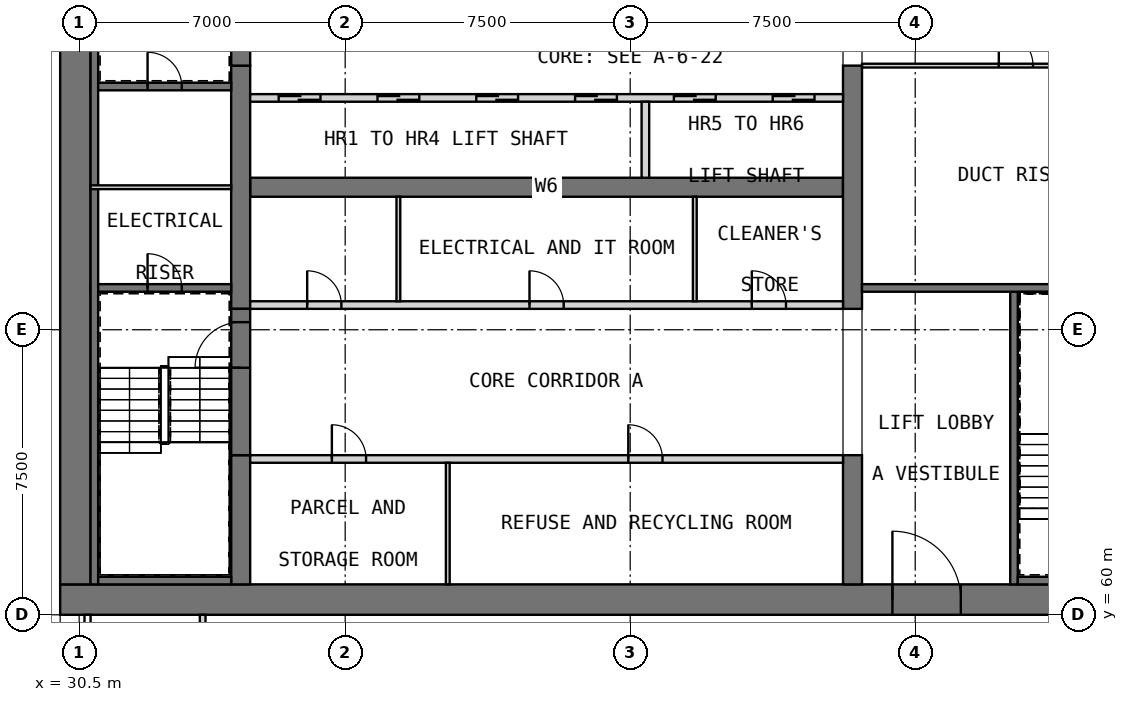
"""IFC4 building model, lengths in metres.
Left out: names, types, materials, properties, quantities, classifications, styles, units other than length and angle.
Written with IfcOpenShell. Run it as: python <this file> out.ifc"""

import sys

from ifc_helpers import new_model, si_unit, direction, frame, frame_2d, origin, place, context, subcontext, project, spatial, rectangle, extrude, element, fill, save


model = new_model("IFC4")
c1 = context("Model", 3, precision=1e-05, world=origin(), true_north=direction((0.0, 1.0)))
c2 = subcontext(c1, "Body", "Model", "MODEL_VIEW")
j1 = project(units=[si_unit("LENGTHUNIT", "METRE"), si_unit("PLANEANGLEUNIT", "RADIAN")], contexts=[c1])
p1 = place(None, origin())
s1 = spatial("IfcSite", under=j1, at=p1, CompositionType="ELEMENT")
p2 = place(p1, origin())
s2 = spatial("IfcBuilding", under=s1, at=p2, CompositionType="ELEMENT")
p3 = place(p2, frame((0.0, 0.0, 174.2)))
s3 = spatial("IfcBuildingStorey", under=s2, at=p3, CompositionType="ELEMENT", Elevation=174.2)
p4 = place(p3, frame((30.0, 60.4, 0.0), z_axis=(0.0, 0.0, 1.0), x_axis=(1.0, 0.0, 0.0)))
e1 = element("IfcWall", 1, at=p4, inside=s3, PredefinedType="SHEAR", context=c2, shape_type="SweptSolid", body=[
    extrude(rectangle(XDim=30.0, YDim=0.8, at=frame_2d((15.0, 0.0))), origin(), (0.0, 0.0, 1.0), 5.0),
])
p5 = place(p4, frame((21.9, 0.0, 0.0)))
e2 = element("IfcOpeningElement", 2, at=p5, cuts=e1, PredefinedType="OPENING", context=c2, shape_type="SweptSolid", body=[
    extrude(rectangle(XDim=1.8, YDim=2.1, at=frame_2d((0.9, 1.05))), frame((0.0, 0.41, 0.0), z_axis=(0.0, -1.0, 0.0), x_axis=(1.0, 0.0, 0.0)), (0.0, 0.0, 1.0), 0.82),
])
p6 = place(p4, frame((26.5, 0.0, 0.0)))
e3 = element("IfcOpeningElement", 3, at=p6, cuts=e1, PredefinedType="OPENING", context=c2, shape_type="SweptSolid", body=[
    extrude(rectangle(XDim=1.2, YDim=2.1, at=frame_2d((0.6, 1.05))), frame((0.0, 0.41, 0.0), z_axis=(0.0, -1.0, 0.0), x_axis=(1.0, 0.0, 0.0)), (0.0, 0.0, 1.0), 0.82),
])
p7 = place(p3, frame((30.4, 60.8, 0.0), z_axis=(0.0, 0.0, 1.0), x_axis=(0.0, 1.0, 0.0)))
e4 = element("IfcWall", 4, at=p7, inside=s3, PredefinedType="SHEAR", context=c2, shape_type="SweptSolid", body=[
    extrude(rectangle(XDim=20.9, YDim=0.8, at=frame_2d((10.45, 0.0))), origin(), (0.0, 0.0, 1.0), 5.0),
])
p8 = place(p3, frame((35.0, 71.25, 0.0), z_axis=(0.0, 0.0, 1.0), x_axis=(1.0, 0.0, 0.0)))
e5 = element("IfcWall", 5, at=p8, inside=s3, PredefinedType="SHEAR", context=c2, shape_type="SweptSolid", body=[
    extrude(rectangle(XDim=15.6, YDim=0.5, at=frame_2d((7.8, 0.0))), origin(), (0.0, 0.0, 1.0), 5.0),
])
p9 = place(p3, frame((34.75, 60.8, 0.0), z_axis=(0.0, 0.0, 1.0), x_axis=(0.0, 1.0, 0.0)))
e6 = element("IfcWall", 6, at=p9, inside=s3, PredefinedType="SHEAR", context=c2, shape_type="SweptSolid", body=[
    extrude(rectangle(XDim=3.4, YDim=0.5, at=frame_2d((1.7, 0.0))), origin(), (0.0, 0.0, 1.0), 5.0),
])
p10 = place(p3, frame((34.75, 68.05, 0.0), z_axis=(0.0, 0.0, 1.0), x_axis=(0.0, 1.0, 0.0)))
e7 = element("IfcWall", 7, at=p10, inside=s3, PredefinedType="SHEAR", context=c2, shape_type="SweptSolid", body=[
    extrude(rectangle(XDim=6.4, YDim=0.5, at=frame_2d((3.2, 0.0))), origin(), (0.0, 0.0, 1.0), 5.0),
])
p11 = place(p3, frame((50.85, 60.8, 0.0), z_axis=(0.0, 0.0, 1.0), x_axis=(0.0, 1.0, 0.0)))
e8 = element("IfcWall", 8, at=p11, inside=s3, PredefinedType="SHEAR", context=c2, shape_type="SweptSolid", body=[
    extrude(rectangle(XDim=3.4, YDim=0.5, at=frame_2d((1.7, 0.0))), origin(), (0.0, 0.0, 1.0), 5.0),
])
p12 = place(p3, frame((50.85, 68.05, 0.0), z_axis=(0.0, 0.0, 1.0), x_axis=(0.0, 1.0, 0.0)))
e9 = element("IfcWall", 9, at=p12, inside=s3, PredefinedType="SHEAR", context=c2, shape_type="SweptSolid", body=[
    extrude(rectangle(XDim=6.4, YDim=0.5, at=frame_2d((3.2, 0.0))), origin(), (0.0, 0.0, 1.0), 5.0),
])
p13 = place(p2, frame((0.0, 0.0, 34.0)))
s4 = spatial("IfcBuildingStorey", under=s2, at=p13, CompositionType="ELEMENT", Elevation=34.0)
for number, where, z_axis, x_axis in (
    (10, (29.7, 61.05, 0.0), (0.0, 0.0, 1.0), (0.0, 1.0, 0.0)),
    (11, (29.7, 65.925, 0.0), (0.0, 0.0, 1.0), (0.0, 1.0, 0.0)),
    (12, (29.7, 70.8, 0.0), (0.0, 0.0, 1.0), (0.0, 1.0, 0.0)),
):
    element("IfcWall", number, at=place(p13, frame(where, z_axis=z_axis, x_axis=x_axis)), inside=s4, PredefinedType="SOLIDWALL", context=c2, shape_type="SweptSolid", body=[
        extrude(rectangle(XDim=0.9, YDim=0.6, at=frame_2d((0.45, 0.0))), origin(), (0.0, 0.0, 1.0), 286.2),
    ])
p14 = place(p3, frame((35.0, 64.1, 0.0), z_axis=(0.0, 0.0, 1.0), x_axis=(1.0, 0.0, 0.0)))
e13 = element("IfcWall", 13, at=p14, inside=s3, PredefinedType="PARTITIONING", context=c2, shape_type="SweptSolid", body=[
    extrude(rectangle(XDim=15.6, YDim=0.2, at=frame_2d((7.8, 0.0))), origin(), (0.0, 0.0, 1.0), 4.75),
])
p15 = place(p14, frame((2.15, 0.0, 0.0)))
e14 = element("IfcOpeningElement", 14, at=p15, cuts=e13, PredefinedType="OPENING", context=c2, shape_type="SweptSolid", body=[
    extrude(rectangle(XDim=0.9, YDim=2.1, at=frame_2d((0.45, 1.05))), frame((0.0, 0.11, 0.0), z_axis=(0.0, -1.0, 0.0), x_axis=(1.0, 0.0, 0.0)), (0.0, 0.0, 1.0), 0.22),
])
p16 = place(p14, frame((9.95, 0.0, 0.0)))
e15 = element("IfcOpeningElement", 15, at=p16, cuts=e13, PredefinedType="OPENING", context=c2, shape_type="SweptSolid", body=[
    extrude(rectangle(XDim=0.9, YDim=2.1, at=frame_2d((0.45, 1.05))), frame((0.0, 0.11, 0.0), z_axis=(0.0, -1.0, 0.0), x_axis=(1.0, 0.0, 0.0)), (0.0, 0.0, 1.0), 0.22),
])
p17 = place(p3, frame((40.2, 60.8, 0.0), z_axis=(0.0, 0.0, 1.0), x_axis=(0.0, 1.0, 0.0)))
e16 = element("IfcWall", 16, at=p17, inside=s3, PredefinedType="PARTITIONING", context=c2, shape_type="SweptSolid", body=[
    extrude(rectangle(XDim=3.2, YDim=0.1, at=frame_2d((1.6, 0.0))), origin(), (0.0, 0.0, 1.0), 4.75),
])
p18 = place(p3, frame((35.0, 68.15, 0.0), z_axis=(0.0, 0.0, 1.0), x_axis=(1.0, 0.0, 0.0)))
e17 = element("IfcWall", 17, at=p18, inside=s3, PredefinedType="PARTITIONING", context=c2, shape_type="SweptSolid", body=[
    extrude(rectangle(XDim=15.6, YDim=0.2, at=frame_2d((7.8, 0.0))), origin(), (0.0, 0.0, 1.0), 4.75),
])
p19 = place(p18, frame((1.5, 0.0, 0.0)))
e18 = element("IfcOpeningElement", 18, at=p19, cuts=e17, PredefinedType="OPENING", context=c2, shape_type="SweptSolid", body=[
    extrude(rectangle(XDim=0.9, YDim=2.1, at=frame_2d((0.45, 1.05))), frame((0.0, 0.11, 0.0), z_axis=(0.0, -1.0, 0.0), x_axis=(1.0, 0.0, 0.0)), (0.0, 0.0, 1.0), 0.22),
])
p20 = place(p18, frame((7.35, 0.0, 0.0)))
e19 = element("IfcOpeningElement", 19, at=p20, cuts=e17, PredefinedType="OPENING", context=c2, shape_type="SweptSolid", body=[
    extrude(rectangle(XDim=0.9, YDim=2.1, at=frame_2d((0.45, 1.05))), frame((0.0, 0.11, 0.0), z_axis=(0.0, -1.0, 0.0), x_axis=(1.0, 0.0, 0.0)), (0.0, 0.0, 1.0), 0.22),
])
p21 = place(p18, frame((13.2, 0.0, 0.0)))
e20 = element("IfcOpeningElement", 20, at=p21, cuts=e17, PredefinedType="OPENING", context=c2, shape_type="SweptSolid", body=[
    extrude(rectangle(XDim=0.9, YDim=2.1, at=frame_2d((0.45, 1.05))), frame((0.0, 0.11, 0.0), z_axis=(0.0, -1.0, 0.0), x_axis=(1.0, 0.0, 0.0)), (0.0, 0.0, 1.0), 0.22),
])
for number, where, z_axis, x_axis in (
    (21, (38.9, 68.25, 0.0), (0.0, 0.0, 1.0), (0.0, 1.0, 0.0)),
    (22, (46.7, 68.25, 0.0), (0.0, 0.0, 1.0), (0.0, 1.0, 0.0)),
):
    element("IfcWall", number, at=place(p3, frame(where, z_axis=z_axis, x_axis=x_axis)), inside=s3, PredefinedType="PARTITIONING", context=c2, shape_type="SweptSolid", body=[
        extrude(rectangle(XDim=2.75, YDim=0.1, at=frame_2d((1.375, 0.0))), origin(), (0.0, 0.0, 1.0), 4.75),
    ])
p22 = place(p3, frame((35.0, 73.6, 0.0), z_axis=(0.0, 0.0, 1.0), x_axis=(1.0, 0.0, 0.0)))
e23 = element("IfcWall", 23, at=p22, inside=s3, PredefinedType="SOLIDWALL", context=c2, shape_type="SweptSolid", body=[
    extrude(rectangle(XDim=15.6, YDim=0.2, at=frame_2d((7.8, 0.0))), origin(), (0.0, 0.0, 1.0), 5.0),
])
p23 = place(p22, frame((0.75, 0.0, 0.0)))
e24 = element("IfcOpeningElement", 24, at=p23, cuts=e23, PredefinedType="OPENING", context=c2, shape_type="SweptSolid", body=[
    extrude(rectangle(XDim=1.1, YDim=2.1, at=frame_2d((0.55, 1.05))), frame((0.0, 0.11, 0.0), z_axis=(0.0, -1.0, 0.0), x_axis=(1.0, 0.0, 0.0)), (0.0, 0.0, 1.0), 0.22),
])
p24 = place(p22, frame((3.35, 0.0, 0.0)))
e25 = element("IfcOpeningElement", 25, at=p24, cuts=e23, PredefinedType="OPENING", context=c2, shape_type="SweptSolid", body=[
    extrude(rectangle(XDim=1.1, YDim=2.1, at=frame_2d((0.55, 1.05))), frame((0.0, 0.11, 0.0), z_axis=(0.0, -1.0, 0.0), x_axis=(1.0, 0.0, 0.0)), (0.0, 0.0, 1.0), 0.22),
])
p25 = place(p22, frame((5.95, 0.0, 0.0)))
e26 = element("IfcOpeningElement", 26, at=p25, cuts=e23, PredefinedType="OPENING", context=c2, shape_type="SweptSolid", body=[
    extrude(rectangle(XDim=1.1, YDim=2.1, at=frame_2d((0.55, 1.05))), frame((0.0, 0.11, 0.0), z_axis=(0.0, -1.0, 0.0), x_axis=(1.0, 0.0, 0.0)), (0.0, 0.0, 1.0), 0.22),
])
p26 = place(p22, frame((8.55, 0.0, 0.0)))
e27 = element("IfcOpeningElement", 27, at=p26, cuts=e23, PredefinedType="OPENING", context=c2, shape_type="SweptSolid", body=[
    extrude(rectangle(XDim=1.1, YDim=2.1, at=frame_2d((0.55, 1.05))), frame((0.0, 0.11, 0.0), z_axis=(0.0, -1.0, 0.0), x_axis=(1.0, 0.0, 0.0)), (0.0, 0.0, 1.0), 0.22),
])
p27 = place(p22, frame((11.15, 0.0, 0.0)))
e28 = element("IfcOpeningElement", 28, at=p27, cuts=e23, PredefinedType="OPENING", context=c2, shape_type="SweptSolid", body=[
    extrude(rectangle(XDim=1.1, YDim=2.1, at=frame_2d((0.55, 1.05))), frame((0.0, 0.11, 0.0), z_axis=(0.0, -1.0, 0.0), x_axis=(1.0, 0.0, 0.0)), (0.0, 0.0, 1.0), 0.22),
])
p28 = place(p22, frame((13.75, 0.0, 0.0)))
e29 = element("IfcOpeningElement", 29, at=p28, cuts=e23, PredefinedType="OPENING", context=c2, shape_type="SweptSolid", body=[
    extrude(rectangle(XDim=1.1, YDim=2.1, at=frame_2d((0.55, 1.05))), frame((0.0, 0.11, 0.0), z_axis=(0.0, -1.0, 0.0), x_axis=(1.0, 0.0, 0.0)), (0.0, 0.0, 1.0), 0.22),
])
p29 = place(p3, frame((45.4, 71.5, 0.0), z_axis=(0.0, 0.0, 1.0), x_axis=(0.0, 1.0, 0.0)))
e30 = element("IfcWall", 30, at=p29, inside=s3, PredefinedType="SOLIDWALL", context=c2, shape_type="SweptSolid", body=[
    extrude(rectangle(XDim=2.0, YDim=0.2, at=frame_2d((1.0, 0.0))), origin(), (0.0, 0.0, 1.0), 5.0),
])
p30 = place(p3, frame((34.75, 64.2, 0.0), z_axis=(0.0, 0.0, 1.0), x_axis=(0.0, 1.0, 0.0)))
e31 = element("IfcWall", 31, at=p30, inside=s3, PredefinedType="SOLIDWALL", context=c2, shape_type="SweptSolid", body=[
    extrude(rectangle(XDim=3.85, YDim=0.5, at=frame_2d((1.925, 0.0))), origin(), (0.0, 0.0, 1.0), 3.8),
])
p31 = place(p30, frame((2.3, 0.0, 0.0)))
e32 = element("IfcOpeningElement", 32, at=p31, cuts=e31, PredefinedType="OPENING", context=c2, shape_type="SweptSolid", body=[
    extrude(rectangle(XDim=1.2, YDim=2.1, at=frame_2d((0.6, 1.05))), frame((0.0, 0.26, 0.0), z_axis=(0.0, -1.0, 0.0), x_axis=(1.0, 0.0, 0.0)), (0.0, 0.0, 1.0), 0.52),
])
p32 = place(p3, frame((34.75, 74.45, 0.0), z_axis=(0.0, 0.0, 1.0), x_axis=(0.0, 1.0, 0.0)))
e33 = element("IfcWall", 33, at=p32, inside=s3, PredefinedType="SOLIDWALL", context=c2, shape_type="SweptSolid", body=[
    extrude(rectangle(XDim=3.85, YDim=0.5, at=frame_2d((1.925, 0.0))), origin(), (0.0, 0.0, 1.0), 3.8),
])
p33 = place(p32, frame((1.0, 0.0, 0.0)))
e34 = element("IfcOpeningElement", 34, at=p33, cuts=e33, PredefinedType="OPENING", context=c2, shape_type="SweptSolid", body=[
    extrude(rectangle(XDim=1.2, YDim=2.1, at=frame_2d((0.6, 1.05))), frame((0.0, 0.26, 0.0), z_axis=(0.0, -1.0, 0.0), x_axis=(1.0, 0.0, 0.0)), (0.0, 0.0, 1.0), 0.52),
])
p34 = place(p3, frame((30.8, 68.6, 0.0), z_axis=(0.0, 0.0, 1.0), x_axis=(1.0, 0.0, 0.0)))
e35 = element("IfcWall", 35, at=p34, inside=s3, PredefinedType="SOLIDWALL", context=c2, shape_type="SweptSolid", body=[
    extrude(rectangle(XDim=3.7, YDim=0.2, at=frame_2d((1.85, 0.0))), origin(), (0.0, 0.0, 1.0), 4.75),
])
p35 = place(p34, frame((1.5, 0.0, 0.0)))
e36 = element("IfcOpeningElement", 36, at=p35, cuts=e35, PredefinedType="OPENING", context=c2, shape_type="SweptSolid", body=[
    extrude(rectangle(XDim=0.9, YDim=2.1, at=frame_2d((0.45, 1.05))), frame((0.0, 0.11, 0.0), z_axis=(0.0, -1.0, 0.0), x_axis=(1.0, 0.0, 0.0)), (0.0, 0.0, 1.0), 0.22),
])
p36 = place(p3, frame((30.8, 73.9, 0.0), z_axis=(0.0, 0.0, 1.0), x_axis=(1.0, 0.0, 0.0)))
e37 = element("IfcWall", 37, at=p36, inside=s3, PredefinedType="SOLIDWALL", context=c2, shape_type="SweptSolid", body=[
    extrude(rectangle(XDim=3.7, YDim=0.2, at=frame_2d((1.85, 0.0))), origin(), (0.0, 0.0, 1.0), 4.75),
])
p37 = place(p36, frame((1.5, 0.0, 0.0)))
e38 = element("IfcOpeningElement", 38, at=p37, cuts=e37, PredefinedType="OPENING", context=c2, shape_type="SweptSolid", body=[
    extrude(rectangle(XDim=0.9, YDim=2.1, at=frame_2d((0.45, 1.05))), frame((0.0, 0.11, 0.0), z_axis=(0.0, -1.0, 0.0), x_axis=(1.0, 0.0, 0.0)), (0.0, 0.0, 1.0), 0.22),
])
p38 = place(p3, frame((55.1, 60.8, 0.0), z_axis=(0.0, 0.0, 1.0), x_axis=(0.0, 1.0, 0.0)))
e39 = element("IfcWall", 39, at=p38, inside=s3, PredefinedType="SOLIDWALL", context=c2, shape_type="SweptSolid", body=[
    extrude(rectangle(XDim=7.8, YDim=0.2, at=frame_2d((3.9, 0.0))), origin(), (0.0, 0.0, 1.0), 4.75),
])
p39 = place(p3, frame((51.1, 68.6, 0.0), z_axis=(0.0, 0.0, 1.0), x_axis=(1.0, 0.0, 0.0)))
e40 = element("IfcWall", 40, at=p39, inside=s3, PredefinedType="SOLIDWALL", context=c2, shape_type="SweptSolid", body=[
    extrude(rectangle(XDim=8.1, YDim=0.2, at=frame_2d((4.05, 0.0))), origin(), (0.0, 0.0, 1.0), 4.75),
])
p40 = place(p3, frame((30.9, 60.8, 0.0), z_axis=(0.0, 0.0, 1.0), x_axis=(0.0, 1.0, 0.0)))
e41 = element("IfcWall", 41, at=p40, inside=s3, PredefinedType="SOLIDWALL", context=c2, shape_type="SweptSolid", body=[
    extrude(rectangle(XDim=20.9, YDim=0.2, at=frame_2d((10.45, 0.0))), origin(), (0.0, 0.0, 1.0), 4.75),
])
p41 = place(p3, frame((31.0, 60.9, 0.0), z_axis=(0.0, 0.0, 1.0), x_axis=(1.0, 0.0, 0.0)))
e42 = element("IfcWall", 42, at=p41, inside=s3, PredefinedType="SOLIDWALL", context=c2, shape_type="SweptSolid", body=[
    extrude(rectangle(XDim=3.5, YDim=0.2, at=frame_2d((1.75, 0.0))), origin(), (0.0, 0.0, 1.0), 4.75),
])
p42 = place(p3, frame((55.2, 60.9, 0.0), z_axis=(0.0, 0.0, 1.0), x_axis=(1.0, 0.0, 0.0)))
e43 = element("IfcWall", 43, at=p42, inside=s3, PredefinedType="SOLIDWALL", context=c2, shape_type="SweptSolid", body=[
    extrude(rectangle(XDim=1.3, YDim=0.2, at=frame_2d((0.65, 0.0))), origin(), (0.0, 0.0, 1.0), 4.75),
])
p43 = place(p3, frame((30.8, 71.25, 0.0), z_axis=(0.0, 0.0, 1.0), x_axis=(1.0, 0.0, 0.0)))
e44 = element("IfcWall", 44, at=p43, inside=s3, PredefinedType="PARTITIONING", context=c2, shape_type="SweptSolid", body=[
    extrude(rectangle(XDim=3.7, YDim=0.1, at=frame_2d((1.85, 0.0))), origin(), (0.0, 0.0, 1.0), 4.75),
])
p44 = place(p3, frame((51.1, 74.45, 0.0), z_axis=(0.0, 0.0, 1.0), x_axis=(1.0, 0.0, 0.0)))
e45 = element("IfcWall", 45, at=p44, inside=s3, PredefinedType="PARTITIONING", context=c2, shape_type="SweptSolid", body=[
    extrude(rectangle(XDim=8.1, YDim=0.1, at=frame_2d((4.05, 0.0))), origin(), (0.0, 0.0, 1.0), 4.75),
])
p45 = place(p44, frame((3.6, 0.0, 0.0)))
e46 = element("IfcOpeningElement", 46, at=p45, cuts=e45, PredefinedType="OPENING", context=c2, shape_type="SweptSolid", body=[
    extrude(rectangle(XDim=0.9, YDim=2.1, at=frame_2d((0.45, 1.05))), frame((0.0, 0.06, 0.0), z_axis=(0.0, -1.0, 0.0), x_axis=(1.0, 0.0, 0.0)), (0.0, 0.0, 1.0), 0.12),
])
p46 = place(p3, frame((33.75, 57.975, 0.0), z_axis=(0.0, 0.0, 1.0), x_axis=(0.0, 1.0, 0.0)))
e47 = element("IfcWall", 47, at=p46, inside=s3, PredefinedType="PARTITIONING", context=c2, shape_type="SweptSolid", body=[
    extrude(rectangle(XDim=2.025, YDim=0.15, at=frame_2d((1.012, 0.0))), origin(), (0.0, 0.0, 1.0), 4.75),
])
p47 = place(p15, origin())
e48 = element("IfcDoor", 48, at=p47, inside=s3, OperationType="SINGLE_SWING_RIGHT", PredefinedType="DOOR", context=c2, shape_type="SweptSolid", body=[
    extrude(rectangle(XDim=0.9, YDim=2.1, at=frame_2d((0.45, 1.05))), frame((0.0, 0.025, 0.0), z_axis=(0.0, -1.0, 0.0), x_axis=(1.0, 0.0, 0.0)), (0.0, 0.0, 1.0), 0.05),
])
fill(e14, e48)
p48 = place(p16, origin())
e49 = element("IfcDoor", 49, at=p48, inside=s3, OperationType="SINGLE_SWING_LEFT", PredefinedType="DOOR", context=c2, shape_type="SweptSolid", body=[
    extrude(rectangle(XDim=0.9, YDim=2.1, at=frame_2d((0.45, 1.05))), frame((0.0, 0.025, 0.0), z_axis=(0.0, -1.0, 0.0), x_axis=(1.0, 0.0, 0.0)), (0.0, 0.0, 1.0), 0.05),
])
fill(e15, e49)
p49 = place(p19, origin())
e50 = element("IfcDoor", 50, at=p49, inside=s3, OperationType="SINGLE_SWING_RIGHT", PredefinedType="DOOR", context=c2, shape_type="SweptSolid", body=[
    extrude(rectangle(XDim=0.9, YDim=2.1, at=frame_2d((0.45, 1.05))), frame((0.0, 0.025, 0.0), z_axis=(0.0, -1.0, 0.0), x_axis=(1.0, 0.0, 0.0)), (0.0, 0.0, 1.0), 0.05),
])
fill(e18, e50)
p50 = place(p20, origin())
e51 = element("IfcDoor", 51, at=p50, inside=s3, OperationType="SINGLE_SWING_LEFT", PredefinedType="DOOR", context=c2, shape_type="SweptSolid", body=[
    extrude(rectangle(XDim=0.9, YDim=2.1, at=frame_2d((0.45, 1.05))), frame((0.0, 0.025, 0.0), z_axis=(0.0, -1.0, 0.0), x_axis=(1.0, 0.0, 0.0)), (0.0, 0.0, 1.0), 0.05),
])
fill(e19, e51)
p51 = place(p21, origin())
e52 = element("IfcDoor", 52, at=p51, inside=s3, OperationType="SINGLE_SWING_RIGHT", PredefinedType="DOOR", context=c2, shape_type="SweptSolid", body=[
    extrude(rectangle(XDim=0.9, YDim=2.1, at=frame_2d((0.45, 1.05))), frame((0.0, 0.025, 0.0), z_axis=(0.0, -1.0, 0.0), x_axis=(1.0, 0.0, 0.0)), (0.0, 0.0, 1.0), 0.05),
])
fill(e20, e52)
p52 = place(p23, origin())
e53 = element("IfcDoor", 53, at=p52, inside=s3, OperationType="DOUBLE_DOOR_SLIDING", PredefinedType="DOOR", context=c2, shape_type="SweptSolid", body=[
    extrude(rectangle(XDim=1.1, YDim=2.1, at=frame_2d((0.55, 1.05))), frame((0.0, 0.025, 0.0), z_axis=(0.0, -1.0, 0.0), x_axis=(1.0, 0.0, 0.0)), (0.0, 0.0, 1.0), 0.05),
])
fill(e24, e53)
p53 = place(p24, origin())
e54 = element("IfcDoor", 54, at=p53, inside=s3, OperationType="DOUBLE_DOOR_SLIDING", PredefinedType="DOOR", context=c2, shape_type="SweptSolid", body=[
    extrude(rectangle(XDim=1.1, YDim=2.1, at=frame_2d((0.55, 1.05))), frame((0.0, 0.025, 0.0), z_axis=(0.0, -1.0, 0.0), x_axis=(1.0, 0.0, 0.0)), (0.0, 0.0, 1.0), 0.05),
])
fill(e25, e54)
p54 = place(p25, origin())
e55 = element("IfcDoor", 55, at=p54, inside=s3, OperationType="DOUBLE_DOOR_SLIDING", PredefinedType="DOOR", context=c2, shape_type="SweptSolid", body=[
    extrude(rectangle(XDim=1.1, YDim=2.1, at=frame_2d((0.55, 1.05))), frame((0.0, 0.025, 0.0), z_axis=(0.0, -1.0, 0.0), x_axis=(1.0, 0.0, 0.0)), (0.0, 0.0, 1.0), 0.05),
])
fill(e26, e55)
p55 = place(p26, origin())
e56 = element("IfcDoor", 56, at=p55, inside=s3, OperationType="DOUBLE_DOOR_SLIDING", PredefinedType="DOOR", context=c2, shape_type="SweptSolid", body=[
    extrude(rectangle(XDim=1.1, YDim=2.1, at=frame_2d((0.55, 1.05))), frame((0.0, 0.025, 0.0), z_axis=(0.0, -1.0, 0.0), x_axis=(1.0, 0.0, 0.0)), (0.0, 0.0, 1.0), 0.05),
])
fill(e27, e56)
p56 = place(p27, origin())
e57 = element("IfcDoor", 57, at=p56, inside=s3, OperationType="DOUBLE_DOOR_SLIDING", PredefinedType="DOOR", context=c2, shape_type="SweptSolid", body=[
    extrude(rectangle(XDim=1.1, YDim=2.1, at=frame_2d((0.55, 1.05))), frame((0.0, 0.025, 0.0), z_axis=(0.0, -1.0, 0.0), x_axis=(1.0, 0.0, 0.0)), (0.0, 0.0, 1.0), 0.05),
])
fill(e28, e57)
p57 = place(p28, origin())
e58 = element("IfcDoor", 58, at=p57, inside=s3, OperationType="DOUBLE_DOOR_SLIDING", PredefinedType="DOOR", context=c2, shape_type="SweptSolid", body=[
    extrude(rectangle(XDim=1.1, YDim=2.1, at=frame_2d((0.55, 1.05))), frame((0.0, 0.025, 0.0), z_axis=(0.0, -1.0, 0.0), x_axis=(1.0, 0.0, 0.0)), (0.0, 0.0, 1.0), 0.05),
])
fill(e29, e58)
p58 = place(p5, origin())
e59 = element("IfcDoor", 59, at=p58, inside=s3, OperationType="DOUBLE_DOOR_SINGLE_SWING", PredefinedType="DOOR", context=c2, shape_type="SweptSolid", body=[
    extrude(rectangle(XDim=1.8, YDim=2.1, at=frame_2d((0.9, 1.05))), frame((0.0, 0.025, 0.0), z_axis=(0.0, -1.0, 0.0), x_axis=(1.0, 0.0, 0.0)), (0.0, 0.0, 1.0), 0.05),
])
fill(e2, e59)
p59 = place(p31, origin())
e60 = element("IfcDoor", 60, at=p59, inside=s3, OperationType="SINGLE_SWING_LEFT", PredefinedType="DOOR", context=c2, shape_type="SweptSolid", body=[
    extrude(rectangle(XDim=1.2, YDim=2.1, at=frame_2d((0.6, 1.05))), frame((0.0, 0.025, 0.0), z_axis=(0.0, -1.0, 0.0), x_axis=(1.0, 0.0, 0.0)), (0.0, 0.0, 1.0), 0.05),
])
fill(e32, e60)
p60 = place(p35, origin())
e61 = element("IfcDoor", 61, at=p60, inside=s3, OperationType="SINGLE_SWING_LEFT", PredefinedType="DOOR", context=c2, shape_type="SweptSolid", body=[
    extrude(rectangle(XDim=0.9, YDim=2.1, at=frame_2d((0.45, 1.05))), frame((0.0, 0.025, 0.0), z_axis=(0.0, -1.0, 0.0), x_axis=(1.0, 0.0, 0.0)), (0.0, 0.0, 1.0), 0.05),
])
fill(e36, e61)
p61 = place(p37, origin())
e62 = element("IfcDoor", 62, at=p61, inside=s3, OperationType="SINGLE_SWING_RIGHT", PredefinedType="DOOR", context=c2, shape_type="SweptSolid", body=[
    extrude(rectangle(XDim=0.9, YDim=2.1, at=frame_2d((0.45, 1.05))), frame((0.0, 0.025, 0.0), z_axis=(0.0, -1.0, 0.0), x_axis=(1.0, 0.0, 0.0)), (0.0, 0.0, 1.0), 0.05),
])
fill(e38, e62)
p62 = place(p45, origin())
e63 = element("IfcDoor", 63, at=p62, inside=s3, OperationType="SINGLE_SWING_RIGHT", PredefinedType="DOOR", context=c2, shape_type="SweptSolid", body=[
    extrude(rectangle(XDim=0.9, YDim=2.1, at=frame_2d((0.45, 1.05))), frame((0.0, 0.025, 0.0), z_axis=(0.0, -1.0, 0.0), x_axis=(1.0, 0.0, 0.0)), (0.0, 0.0, 1.0), 0.05),
])
fill(e46, e63)
save(model, sys.argv[1])
